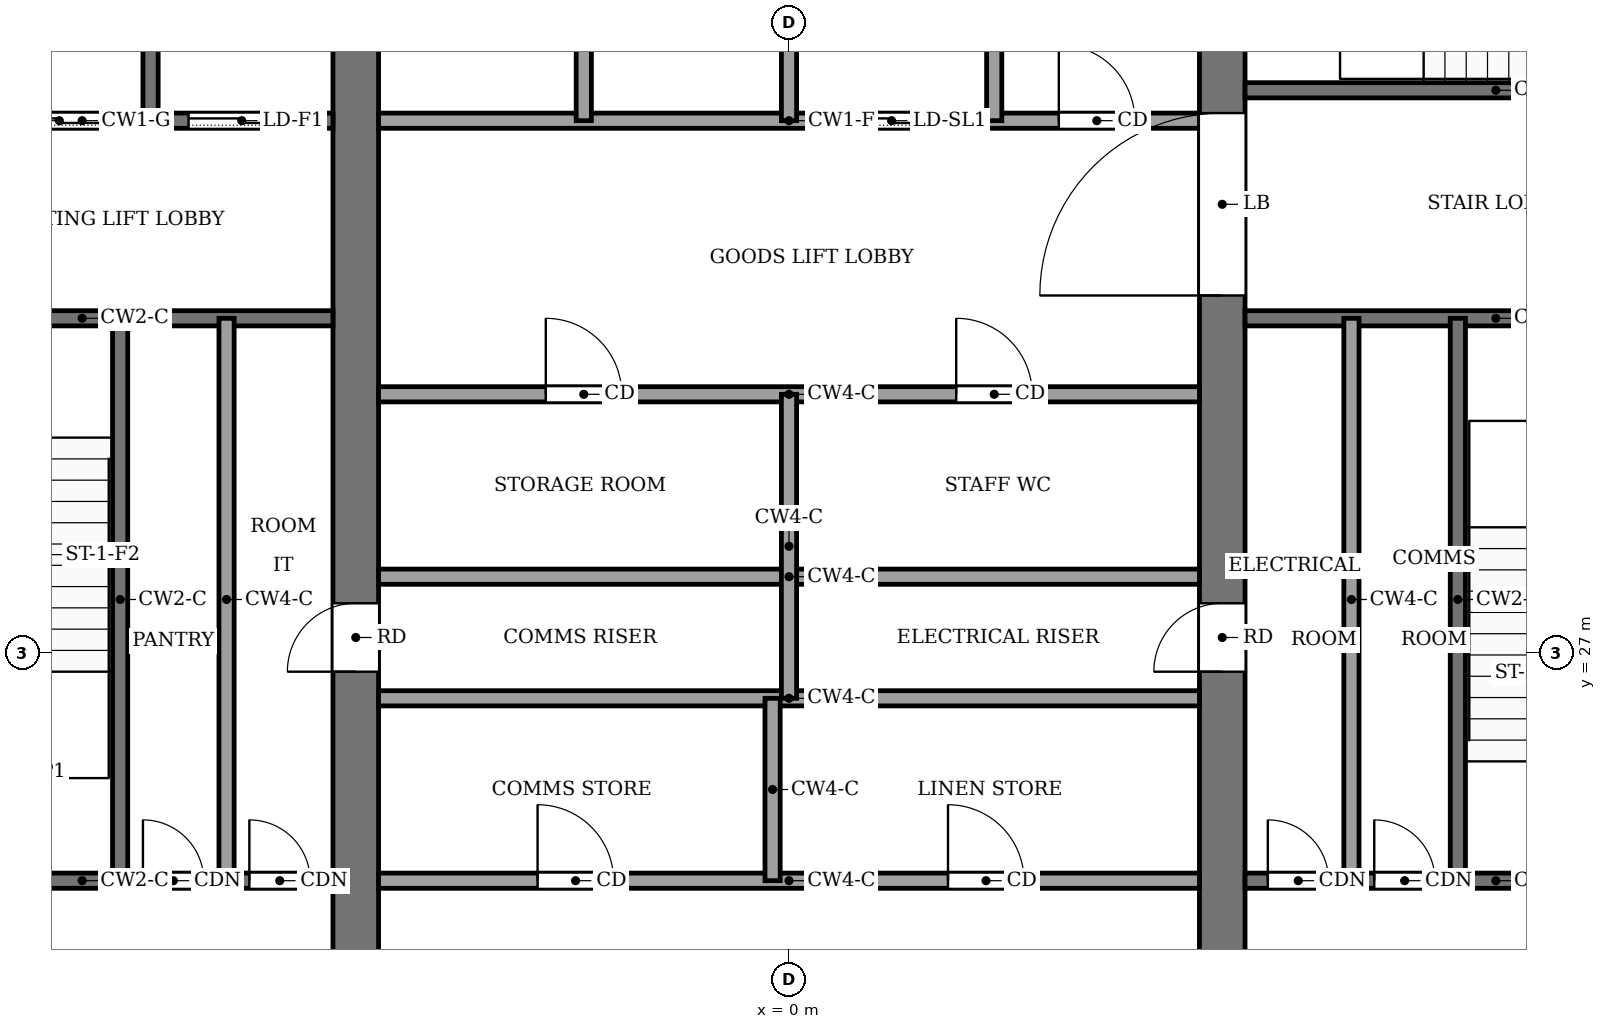
"""IFC4 building model, lengths in metres.
Left out: names, types, materials, properties, quantities, classifications, styles, units other than length and angle.
Written with IfcOpenShell. Run it as: python <this file> out.ifc"""

import sys

from ifc_helpers import new_model, si_unit, direction, frame, frame_2d, origin, place, context, subcontext, project, spatial, rectangle, extrude, element, fill, save


model = new_model("IFC4")
c1 = context("Model", 3, precision=1e-05, world=origin(), true_north=direction((0.0, 1.0)))
c2 = subcontext(c1, "Body", "Model", "MODEL_VIEW")
j1 = project(units=[si_unit("LENGTHUNIT", "METRE"), si_unit("PLANEANGLEUNIT", "RADIAN")], contexts=[c1])
p1 = place(None, origin())
s1 = spatial("IfcSite", under=j1, at=p1, CompositionType="ELEMENT")
p2 = place(p1, origin())
s2 = spatial("IfcBuilding", under=s1, at=p2, CompositionType="ELEMENT")
p3 = place(p2, frame((0.0, 0.0, 298.0)))
s3 = spatial("IfcBuildingStorey", under=s2, at=p3, CompositionType="ELEMENT", Elevation=298.0)
p4 = place(p3, frame((-5.7, 18.4, -0.13), z_axis=(0.0, 0.0, 1.0), x_axis=(0.0, 1.0, 0.0)))
e1 = element("IfcWall", 1, at=p4, inside=s3, PredefinedType="SHEAR", context=c2, shape_type="SweptSolid", body=[
    extrude(rectangle(XDim=19.2, YDim=0.6, at=frame_2d((9.6, 0.0))), origin(), (0.0, 0.0, 1.0), 4.0),
])
p5 = place(p4, frame((8.35, 0.0, 0.13)))
e2 = element("IfcOpeningElement", 2, at=p5, cuts=e1, PredefinedType="OPENING", context=c2, shape_type="SweptSolid", body=[
    extrude(rectangle(XDim=0.9, YDim=2.1, at=frame_2d((0.45, 1.05))), frame((0.0, 0.31, 0.0), z_axis=(0.0, -1.0, 0.0), x_axis=(1.0, 0.0, 0.0)), (0.0, 0.0, 1.0), 0.62),
])
p6 = place(p3, frame((5.7, 18.4, -0.13), z_axis=(0.0, 0.0, 1.0), x_axis=(0.0, 1.0, 0.0)))
e3 = element("IfcWall", 3, at=p6, inside=s3, PredefinedType="SHEAR", context=c2, shape_type="SweptSolid", body=[
    extrude(rectangle(XDim=19.2, YDim=0.6, at=frame_2d((9.6, 0.0))), origin(), (0.0, 0.0, 1.0), 4.0),
])
p7 = place(p6, frame((8.35, 0.0, 0.13)))
e4 = element("IfcOpeningElement", 4, at=p7, cuts=e3, PredefinedType="OPENING", context=c2, shape_type="SweptSolid", body=[
    extrude(rectangle(XDim=0.9, YDim=2.1, at=frame_2d((0.45, 1.05))), frame((0.0, 0.31, 0.0), z_axis=(0.0, -1.0, 0.0), x_axis=(1.0, 0.0, 0.0)), (0.0, 0.0, 1.0), 0.62),
])
p8 = place(p6, frame((13.3, 0.0, 0.13)))
e5 = element("IfcOpeningElement", 5, at=p8, cuts=e3, PredefinedType="OPENING", context=c2, shape_type="SweptSolid", body=[
    extrude(rectangle(XDim=2.4, YDim=2.4, at=frame_2d((1.2, 1.2))), frame((0.0, 0.31, 0.0), z_axis=(0.0, -1.0, 0.0), x_axis=(1.0, 0.0, 0.0)), (0.0, 0.0, 1.0), 0.62),
])
p9 = place(p3, frame((-12.6, 24.0, 0.0), z_axis=(0.0, 0.0, 1.0), x_axis=(1.0, 0.0, 0.0)))
e6 = element("IfcWall", 6, at=p9, inside=s3, PredefinedType="PARTITIONING", context=c2, shape_type="SweptSolid", body=[
    extrude(rectangle(XDim=6.6, YDim=0.2, at=frame_2d((3.3, 0.0))), origin(), (0.0, 0.0, 1.0), 3.87),
])
p10 = place(p9, frame((4.1, 0.0, 0.0)))
e7 = element("IfcOpeningElement", 7, at=p10, cuts=e6, PredefinedType="OPENING", context=c2, shape_type="SweptSolid", body=[
    extrude(rectangle(XDim=0.8, YDim=2.1, at=frame_2d((0.4, 1.05))), frame((0.0, 0.11, 0.0), z_axis=(0.0, -1.0, 0.0), x_axis=(1.0, 0.0, 0.0)), (0.0, 0.0, 1.0), 0.22),
])
p11 = place(p9, frame((5.5, 0.0, 0.0)))
e8 = element("IfcOpeningElement", 8, at=p11, cuts=e6, PredefinedType="OPENING", context=c2, shape_type="SweptSolid", body=[
    extrude(rectangle(XDim=0.8, YDim=2.1, at=frame_2d((0.4, 1.05))), frame((0.0, 0.11, 0.0), z_axis=(0.0, -1.0, 0.0), x_axis=(1.0, 0.0, 0.0)), (0.0, 0.0, 1.0), 0.22),
])
p12 = place(p3, frame((-5.4, 24.0, 0.0), z_axis=(0.0, 0.0, 1.0), x_axis=(1.0, 0.0, 0.0)))
e9 = element("IfcWall", 9, at=p12, inside=s3, PredefinedType="PARTITIONING", context=c2, shape_type="SweptSolid", body=[
    extrude(rectangle(XDim=10.8, YDim=0.2, at=frame_2d((5.4, 0.0))), origin(), (0.0, 0.0, 1.0), 3.87),
])
p13 = place(p12, frame((2.092, 0.0, 0.0)))
e10 = element("IfcOpeningElement", 10, at=p13, cuts=e9, PredefinedType="OPENING", context=c2, shape_type="SweptSolid", body=[
    extrude(rectangle(XDim=1.0, YDim=2.1, at=frame_2d((0.5, 1.05))), frame((0.0, 0.11, 0.0), z_axis=(0.0, -1.0, 0.0), x_axis=(1.0, 0.0, 0.0)), (0.0, 0.0, 1.0), 0.22),
])
p14 = place(p12, frame((7.492, 0.0, 0.0)))
e11 = element("IfcOpeningElement", 11, at=p14, cuts=e9, PredefinedType="OPENING", context=c2, shape_type="SweptSolid", body=[
    extrude(rectangle(XDim=1.0, YDim=2.1, at=frame_2d((0.5, 1.05))), frame((0.0, 0.11, 0.0), z_axis=(0.0, -1.0, 0.0), x_axis=(1.0, 0.0, 0.0)), (0.0, 0.0, 1.0), 0.22),
])
p15 = place(p3, frame((6.0, 24.0, 0.0), z_axis=(0.0, 0.0, 1.0), x_axis=(1.0, 0.0, 0.0)))
e12 = element("IfcWall", 12, at=p15, inside=s3, PredefinedType="PARTITIONING", context=c2, shape_type="SweptSolid", body=[
    extrude(rectangle(XDim=6.6, YDim=0.2, at=frame_2d((3.3, 0.0))), origin(), (0.0, 0.0, 1.0), 3.87),
])
p16 = place(p15, frame((0.3, 0.0, 0.0)))
e13 = element("IfcOpeningElement", 13, at=p16, cuts=e12, PredefinedType="OPENING", context=c2, shape_type="SweptSolid", body=[
    extrude(rectangle(XDim=0.8, YDim=2.1, at=frame_2d((0.4, 1.05))), frame((0.0, 0.11, 0.0), z_axis=(0.0, -1.0, 0.0), x_axis=(1.0, 0.0, 0.0)), (0.0, 0.0, 1.0), 0.22),
])
p17 = place(p15, frame((1.7, 0.0, 0.0)))
e14 = element("IfcOpeningElement", 14, at=p17, cuts=e12, PredefinedType="OPENING", context=c2, shape_type="SweptSolid", body=[
    extrude(rectangle(XDim=0.8, YDim=2.1, at=frame_2d((0.4, 1.05))), frame((0.0, 0.11, 0.0), z_axis=(0.0, -1.0, 0.0), x_axis=(1.0, 0.0, 0.0)), (0.0, 0.0, 1.0), 0.22),
])
p18 = place(p15, frame((4.4, 0.0, 0.0)))
e15 = element("IfcOpeningElement", 15, at=p18, cuts=e12, PredefinedType="OPENING", context=c2, shape_type="SweptSolid", body=[
    extrude(rectangle(XDim=1.2, YDim=2.2, at=frame_2d((0.6, 1.1))), frame((0.0, 0.11, 0.0), z_axis=(0.0, -1.0, 0.0), x_axis=(1.0, 0.0, 0.0)), (0.0, 0.0, 1.0), 0.22),
])
for number, where, z_axis, x_axis in (
    (16, (-5.4, 26.4, 0.0), (0.0, 0.0, 1.0), (1.0, 0.0, 0.0)),
    (17, (-5.4, 28.0, 0.0), (0.0, 0.0, 1.0), (1.0, 0.0, 0.0)),
):
    element("IfcWall", number, at=place(p3, frame(where, z_axis=z_axis, x_axis=x_axis)), inside=s3, PredefinedType="PARTITIONING", context=c2, shape_type="SweptSolid", body=[
        extrude(rectangle(XDim=10.8, YDim=0.2, at=frame_2d((5.4, 0.0))), origin(), (0.0, 0.0, 1.0), 3.87),
    ])
p19 = place(p3, frame((-5.4, 30.4, 0.0), z_axis=(0.0, 0.0, 1.0), x_axis=(1.0, 0.0, 0.0)))
e18 = element("IfcWall", 18, at=p19, inside=s3, PredefinedType="PARTITIONING", context=c2, shape_type="SweptSolid", body=[
    extrude(rectangle(XDim=10.8, YDim=0.2, at=frame_2d((5.4, 0.0))), origin(), (0.0, 0.0, 1.0), 3.87),
])
p20 = place(p19, frame((2.2, 0.0, 0.0)))
e19 = element("IfcOpeningElement", 19, at=p20, cuts=e18, PredefinedType="OPENING", context=c2, shape_type="SweptSolid", body=[
    extrude(rectangle(XDim=1.0, YDim=2.1, at=frame_2d((0.5, 1.05))), frame((0.0, 0.11, 0.0), z_axis=(0.0, -1.0, 0.0), x_axis=(1.0, 0.0, 0.0)), (0.0, 0.0, 1.0), 0.22),
])
p21 = place(p19, frame((7.6, 0.0, 0.0)))
e20 = element("IfcOpeningElement", 20, at=p21, cuts=e18, PredefinedType="OPENING", context=c2, shape_type="SweptSolid", body=[
    extrude(rectangle(XDim=1.0, YDim=2.1, at=frame_2d((0.5, 1.05))), frame((0.0, 0.11, 0.0), z_axis=(0.0, -1.0, 0.0), x_axis=(1.0, 0.0, 0.0)), (0.0, 0.0, 1.0), 0.22),
])
p22 = place(p3, frame((-12.6, 31.4, 0.0), z_axis=(0.0, 0.0, 1.0), x_axis=(1.0, 0.0, 0.0)))
e21 = element("IfcWall", 21, at=p22, inside=s3, PredefinedType="PARTITIONING", context=c2, shape_type="SweptSolid", body=[
    extrude(rectangle(XDim=6.6, YDim=0.2, at=frame_2d((3.3, 0.0))), origin(), (0.0, 0.0, 1.0), 3.87),
])
p23 = place(p22, frame((1.0, 0.0, 0.0)))
e22 = element("IfcOpeningElement", 22, at=p23, cuts=e21, PredefinedType="OPENING", context=c2, shape_type="SweptSolid", body=[
    extrude(rectangle(XDim=1.2, YDim=2.2, at=frame_2d((0.6, 1.1))), frame((0.0, 0.11, 0.0), z_axis=(0.0, -1.0, 0.0), x_axis=(1.0, 0.0, 0.0)), (0.0, 0.0, 1.0), 0.22),
])
p24 = place(p3, frame((6.0, 31.4, 0.0), z_axis=(0.0, 0.0, 1.0), x_axis=(1.0, 0.0, 0.0)))
e23 = element("IfcWall", 23, at=p24, inside=s3, PredefinedType="PARTITIONING", context=c2, shape_type="SweptSolid", body=[
    extrude(rectangle(XDim=6.6, YDim=0.2, at=frame_2d((3.3, 0.0))), origin(), (0.0, 0.0, 1.0), 3.87),
])
p25 = place(p3, frame((-12.6, 34.0, 0.0), z_axis=(0.0, 0.0, 1.0), x_axis=(1.0, 0.0, 0.0)))
e24 = element("IfcWall", 24, at=p25, inside=s3, PredefinedType="PARTITIONING", context=c2, shape_type="SweptSolid", body=[
    extrude(rectangle(XDim=6.6, YDim=0.2, at=frame_2d((3.3, 0.0))), origin(), (0.0, 0.0, 1.0), 3.87),
])
p26 = place(p25, frame((4.7, 0.0, 0.0)))
e25 = element("IfcOpeningElement", 25, at=p26, cuts=e24, PredefinedType="OPENING", context=c2, shape_type="SweptSolid", body=[
    extrude(rectangle(XDim=1.4, YDim=2.2, at=frame_2d((0.7, 1.1))), frame((0.0, 0.11, 0.0), z_axis=(0.0, -1.0, 0.0), x_axis=(1.0, 0.0, 0.0)), (0.0, 0.0, 1.0), 0.22),
])
p27 = place(p25, frame((2.3, 0.0, 0.0)))
e26 = element("IfcOpeningElement", 26, at=p27, cuts=e24, PredefinedType="OPENING", context=c2, shape_type="SweptSolid", body=[
    extrude(rectangle(XDim=1.4, YDim=2.2, at=frame_2d((0.7, 1.1))), frame((0.0, 0.11, 0.0), z_axis=(0.0, -1.0, 0.0), x_axis=(1.0, 0.0, 0.0)), (0.0, 0.0, 1.0), 0.22),
])
p28 = place(p25, frame((0.45, 0.0, 0.0)))
e27 = element("IfcOpeningElement", 27, at=p28, cuts=e24, PredefinedType="OPENING", context=c2, shape_type="SweptSolid", body=[
    extrude(rectangle(XDim=0.9, YDim=2.1, at=frame_2d((0.45, 1.05))), frame((0.0, 0.11, 0.0), z_axis=(0.0, -1.0, 0.0), x_axis=(1.0, 0.0, 0.0)), (0.0, 0.0, 1.0), 0.22),
])
p29 = place(p3, frame((-5.4, 34.0, 0.0), z_axis=(0.0, 0.0, 1.0), x_axis=(1.0, 0.0, 0.0)))
e28 = element("IfcWall", 28, at=p29, inside=s3, PredefinedType="PARTITIONING", context=c2, shape_type="SweptSolid", body=[
    extrude(rectangle(XDim=10.8, YDim=0.2, at=frame_2d((5.4, 0.0))), origin(), (0.0, 0.0, 1.0), 3.87),
])
p30 = place(p29, frame((6.15, 0.0, 0.0)))
e29 = element("IfcOpeningElement", 29, at=p30, cuts=e28, PredefinedType="OPENING", context=c2, shape_type="SweptSolid", body=[
    extrude(rectangle(XDim=1.2, YDim=2.2, at=frame_2d((0.6, 1.1))), frame((0.0, 0.11, 0.0), z_axis=(0.0, -1.0, 0.0), x_axis=(1.0, 0.0, 0.0)), (0.0, 0.0, 1.0), 0.22),
])
p31 = place(p29, frame((8.95, 0.0, 0.0)))
e30 = element("IfcOpeningElement", 30, at=p31, cuts=e28, PredefinedType="OPENING", context=c2, shape_type="SweptSolid", body=[
    extrude(rectangle(XDim=1.0, YDim=2.1, at=frame_2d((0.5, 1.05))), frame((0.0, 0.11, 0.0), z_axis=(0.0, -1.0, 0.0), x_axis=(1.0, 0.0, 0.0)), (0.0, 0.0, 1.0), 0.22),
])
p32 = place(p3, frame((6.0, 34.4, 0.0), z_axis=(0.0, 0.0, 1.0), x_axis=(1.0, 0.0, 0.0)))
e31 = element("IfcWall", 31, at=p32, inside=s3, PredefinedType="PARTITIONING", context=c2, shape_type="SweptSolid", body=[
    extrude(rectangle(XDim=6.6, YDim=0.2, at=frame_2d((3.3, 0.0))), origin(), (0.0, 0.0, 1.0), 3.87),
])
p33 = place(p32, frame((4.8, 0.0, 0.0)))
e32 = element("IfcOpeningElement", 32, at=p33, cuts=e31, PredefinedType="OPENING", context=c2, shape_type="SweptSolid", body=[
    extrude(rectangle(XDim=1.2, YDim=2.2, at=frame_2d((0.6, 1.1))), frame((0.0, 0.11, 0.0), z_axis=(0.0, -1.0, 0.0), x_axis=(1.0, 0.0, 0.0)), (0.0, 0.0, 1.0), 0.22),
])
p34 = place(p3, frame((-8.8, 24.0, 0.0), z_axis=(0.0, 0.0, 1.0), x_axis=(0.0, 1.0, 0.0)))
e33 = element("IfcWall", 33, at=p34, inside=s3, PredefinedType="PARTITIONING", context=c2, shape_type="SweptSolid", body=[
    extrude(rectangle(XDim=7.4, YDim=0.2, at=frame_2d((3.7, 0.0))), origin(), (0.0, 0.0, 1.0), 3.87),
])
p35 = place(p3, frame((-8.4, 34.0, 0.0), z_axis=(0.0, 0.0, 1.0), x_axis=(0.0, 1.0, 0.0)))
e34 = element("IfcWall", 34, at=p35, inside=s3, PredefinedType="PARTITIONING", context=c2, shape_type="SweptSolid", body=[
    extrude(rectangle(XDim=3.6, YDim=0.2, at=frame_2d((1.8, 0.0))), origin(), (0.0, 0.0, 1.0), 3.87),
])
p36 = place(p3, frame((-7.4, 24.0, 0.0), z_axis=(0.0, 0.0, 1.0), x_axis=(0.0, 1.0, 0.0)))
e35 = element("IfcWall", 35, at=p36, inside=s3, PredefinedType="PARTITIONING", context=c2, shape_type="SweptSolid", body=[
    extrude(rectangle(XDim=7.4, YDim=0.2, at=frame_2d((3.7, 0.0))), origin(), (0.0, 0.0, 1.0), 3.87),
])
p37 = place(p3, frame((-2.7, 34.0, 0.0), z_axis=(0.0, 0.0, 1.0), x_axis=(0.0, 1.0, 0.0)))
e36 = element("IfcWall", 36, at=p37, inside=s3, PredefinedType="PARTITIONING", context=c2, shape_type="SweptSolid", body=[
    extrude(rectangle(XDim=3.6, YDim=0.2, at=frame_2d((1.8, 0.0))), origin(), (0.0, 0.0, 1.0), 3.87),
])
p38 = place(p3, frame((-0.216, 24.0, 0.0), z_axis=(0.0, 0.0, 1.0), x_axis=(0.0, 1.0, 0.0)))
e37 = element("IfcWall", 37, at=p38, inside=s3, PredefinedType="PARTITIONING", context=c2, shape_type="SweptSolid", body=[
    extrude(rectangle(XDim=2.4, YDim=0.2, at=frame_2d((1.2, 0.0))), origin(), (0.0, 0.0, 1.0), 3.87),
])
p39 = place(p3, frame((0.0, 26.4, 0.0), z_axis=(0.0, 0.0, 1.0), x_axis=(0.0, 1.0, 0.0)))
e38 = element("IfcWall", 38, at=p39, inside=s3, PredefinedType="PARTITIONING", context=c2, shape_type="SweptSolid", body=[
    extrude(rectangle(XDim=4.0, YDim=0.2, at=frame_2d((2.0, 0.0))), origin(), (0.0, 0.0, 1.0), 3.87),
])
for number, where, z_axis, x_axis in (
    (39, (0.0, 34.0, 0.0), (0.0, 0.0, 1.0), (0.0, 1.0, 0.0)),
    (40, (2.7, 34.0, 0.0), (0.0, 0.0, 1.0), (0.0, 1.0, 0.0)),
):
    element("IfcWall", number, at=place(p3, frame(where, z_axis=z_axis, x_axis=x_axis)), inside=s3, PredefinedType="PARTITIONING", context=c2, shape_type="SweptSolid", body=[
        extrude(rectangle(XDim=3.6, YDim=0.2, at=frame_2d((1.8, 0.0))), origin(), (0.0, 0.0, 1.0), 3.87),
    ])
for number, where, z_axis, x_axis in (
    (41, (7.4, 24.0, 0.0), (0.0, 0.0, 1.0), (0.0, 1.0, 0.0)),
    (42, (8.8, 24.0, 0.0), (0.0, 0.0, 1.0), (0.0, 1.0, 0.0)),
):
    element("IfcWall", number, at=place(p3, frame(where, z_axis=z_axis, x_axis=x_axis)), inside=s3, PredefinedType="PARTITIONING", context=c2, shape_type="SweptSolid", body=[
        extrude(rectangle(XDim=7.4, YDim=0.2, at=frame_2d((3.7, 0.0))), origin(), (0.0, 0.0, 1.0), 3.87),
    ])
p40 = place(p30, origin())
e43 = element("IfcDoor", 43, at=p40, inside=s3, OperationType="SLIDING_TO_LEFT", PredefinedType="DOOR", context=c2, shape_type="SweptSolid", body=[
    extrude(rectangle(XDim=1.2, YDim=2.2, at=frame_2d((0.6, 1.1))), frame((0.0, 0.025, 0.0), z_axis=(0.0, -1.0, 0.0), x_axis=(1.0, 0.0, 0.0)), (0.0, 0.0, 1.0), 0.05),
])
fill(e29, e43)
p41 = place(p26, origin())
e44 = element("IfcDoor", 44, at=p41, inside=s3, OperationType="SLIDING_TO_LEFT", PredefinedType="DOOR", context=c2, shape_type="SweptSolid", body=[
    extrude(rectangle(XDim=1.4, YDim=2.2, at=frame_2d((0.7, 1.1))), frame((0.0, 0.025, 0.0), z_axis=(0.0, -1.0, 0.0), x_axis=(1.0, 0.0, 0.0)), (0.0, 0.0, 1.0), 0.05),
])
fill(e25, e44)
p42 = place(p27, origin())
e45 = element("IfcDoor", 45, at=p42, inside=s3, OperationType="SLIDING_TO_LEFT", PredefinedType="DOOR", context=c2, shape_type="SweptSolid", body=[
    extrude(rectangle(XDim=1.4, YDim=2.2, at=frame_2d((0.7, 1.1))), frame((0.0, 0.025, 0.0), z_axis=(0.0, -1.0, 0.0), x_axis=(1.0, 0.0, 0.0)), (0.0, 0.0, 1.0), 0.05),
])
fill(e26, e45)
p43 = place(p13, origin())
e46 = element("IfcDoor", 46, at=p43, inside=s3, OperationType="SINGLE_SWING_RIGHT", PredefinedType="DOOR", context=c2, shape_type="SweptSolid", body=[
    extrude(rectangle(XDim=1.0, YDim=2.1, at=frame_2d((0.5, 1.05))), frame((0.0, 0.025, 0.0), z_axis=(0.0, -1.0, 0.0), x_axis=(1.0, 0.0, 0.0)), (0.0, 0.0, 1.0), 0.05),
])
fill(e10, e46)
p44 = place(p14, origin())
e47 = element("IfcDoor", 47, at=p44, inside=s3, OperationType="SINGLE_SWING_LEFT", PredefinedType="DOOR", context=c2, shape_type="SweptSolid", body=[
    extrude(rectangle(XDim=1.0, YDim=2.1, at=frame_2d((0.5, 1.05))), frame((0.0, 0.025, 0.0), z_axis=(0.0, -1.0, 0.0), x_axis=(1.0, 0.0, 0.0)), (0.0, 0.0, 1.0), 0.05),
])
fill(e11, e47)
p45 = place(p20, origin())
e48 = element("IfcDoor", 48, at=p45, inside=s3, OperationType="SINGLE_SWING_LEFT", PredefinedType="DOOR", context=c2, shape_type="SweptSolid", body=[
    extrude(rectangle(XDim=1.0, YDim=2.1, at=frame_2d((0.5, 1.05))), frame((0.0, 0.025, 0.0), z_axis=(0.0, -1.0, 0.0), x_axis=(1.0, 0.0, 0.0)), (0.0, 0.0, 1.0), 0.05),
])
fill(e19, e48)
p46 = place(p21, origin())
e49 = element("IfcDoor", 49, at=p46, inside=s3, OperationType="SINGLE_SWING_RIGHT", PredefinedType="DOOR", context=c2, shape_type="SweptSolid", body=[
    extrude(rectangle(XDim=1.0, YDim=2.1, at=frame_2d((0.5, 1.05))), frame((0.0, 0.025, 0.0), z_axis=(0.0, -1.0, 0.0), x_axis=(1.0, 0.0, 0.0)), (0.0, 0.0, 1.0), 0.05),
])
fill(e20, e49)
p47 = place(p10, origin())
e50 = element("IfcDoor", 50, at=p47, inside=s3, OperationType="SINGLE_SWING_RIGHT", PredefinedType="DOOR", context=c2, shape_type="SweptSolid", body=[
    extrude(rectangle(XDim=0.8, YDim=2.1, at=frame_2d((0.4, 1.05))), frame((0.0, 0.025, 0.0), z_axis=(0.0, -1.0, 0.0), x_axis=(1.0, 0.0, 0.0)), (0.0, 0.0, 1.0), 0.05),
])
fill(e7, e50)
p48 = place(p11, origin())
e51 = element("IfcDoor", 51, at=p48, inside=s3, OperationType="SINGLE_SWING_LEFT", PredefinedType="DOOR", context=c2, shape_type="SweptSolid", body=[
    extrude(rectangle(XDim=0.8, YDim=2.1, at=frame_2d((0.4, 1.05))), frame((0.0, 0.025, 0.0), z_axis=(0.0, -1.0, 0.0), x_axis=(1.0, 0.0, 0.0)), (0.0, 0.0, 1.0), 0.05),
])
fill(e8, e51)
p49 = place(p16, origin())
e52 = element("IfcDoor", 52, at=p49, inside=s3, OperationType="SINGLE_SWING_RIGHT", PredefinedType="DOOR", context=c2, shape_type="SweptSolid", body=[
    extrude(rectangle(XDim=0.8, YDim=2.1, at=frame_2d((0.4, 1.05))), frame((0.0, 0.025, 0.0), z_axis=(0.0, -1.0, 0.0), x_axis=(1.0, 0.0, 0.0)), (0.0, 0.0, 1.0), 0.05),
])
fill(e13, e52)
p50 = place(p17, origin())
e53 = element("IfcDoor", 53, at=p50, inside=s3, OperationType="SINGLE_SWING_LEFT", PredefinedType="DOOR", context=c2, shape_type="SweptSolid", body=[
    extrude(rectangle(XDim=0.8, YDim=2.1, at=frame_2d((0.4, 1.05))), frame((0.0, 0.025, 0.0), z_axis=(0.0, -1.0, 0.0), x_axis=(1.0, 0.0, 0.0)), (0.0, 0.0, 1.0), 0.05),
])
fill(e14, e53)
p51 = place(p31, origin())
e54 = element("IfcDoor", 54, at=p51, inside=s3, OperationType="SINGLE_SWING_LEFT", PredefinedType="DOOR", context=c2, shape_type="SweptSolid", body=[
    extrude(rectangle(XDim=1.0, YDim=2.1, at=frame_2d((0.5, 1.05))), frame((0.0, 0.025, 0.0), z_axis=(0.0, -1.0, 0.0), x_axis=(1.0, 0.0, 0.0)), (0.0, 0.0, 1.0), 0.05),
])
fill(e30, e54)
p52 = place(p5, origin())
e55 = element("IfcDoor", 55, at=p52, inside=s3, OperationType="SINGLE_SWING_LEFT", PredefinedType="DOOR", context=c2, shape_type="SweptSolid", body=[
    extrude(rectangle(XDim=0.9, YDim=2.1, at=frame_2d((0.45, 1.05))), frame((0.0, 0.025, 0.0), z_axis=(0.0, -1.0, 0.0), x_axis=(1.0, 0.0, 0.0)), (0.0, 0.0, 1.0), 0.05),
])
fill(e2, e55)
p53 = place(p7, origin())
e56 = element("IfcDoor", 56, at=p53, inside=s3, OperationType="SINGLE_SWING_RIGHT", PredefinedType="DOOR", context=c2, shape_type="SweptSolid", body=[
    extrude(rectangle(XDim=0.9, YDim=2.1, at=frame_2d((0.45, 1.05))), frame((0.0, 0.025, 0.0), z_axis=(0.0, -1.0, 0.0), x_axis=(1.0, 0.0, 0.0)), (0.0, 0.0, 1.0), 0.05),
])
fill(e4, e56)
p54 = place(p8, origin())
e57 = element("IfcDoor", 57, at=p54, inside=s3, OperationType="DOUBLE_DOOR_SINGLE_SWING", PredefinedType="DOOR", context=c2, shape_type="SweptSolid", body=[
    extrude(rectangle(XDim=2.4, YDim=2.4, at=frame_2d((1.2, 1.2))), frame((0.0, 0.025, 0.0), z_axis=(0.0, -1.0, 0.0), x_axis=(1.0, 0.0, 0.0)), (0.0, 0.0, 1.0), 0.05),
])
fill(e5, e57)
save(model, sys.argv[1])
